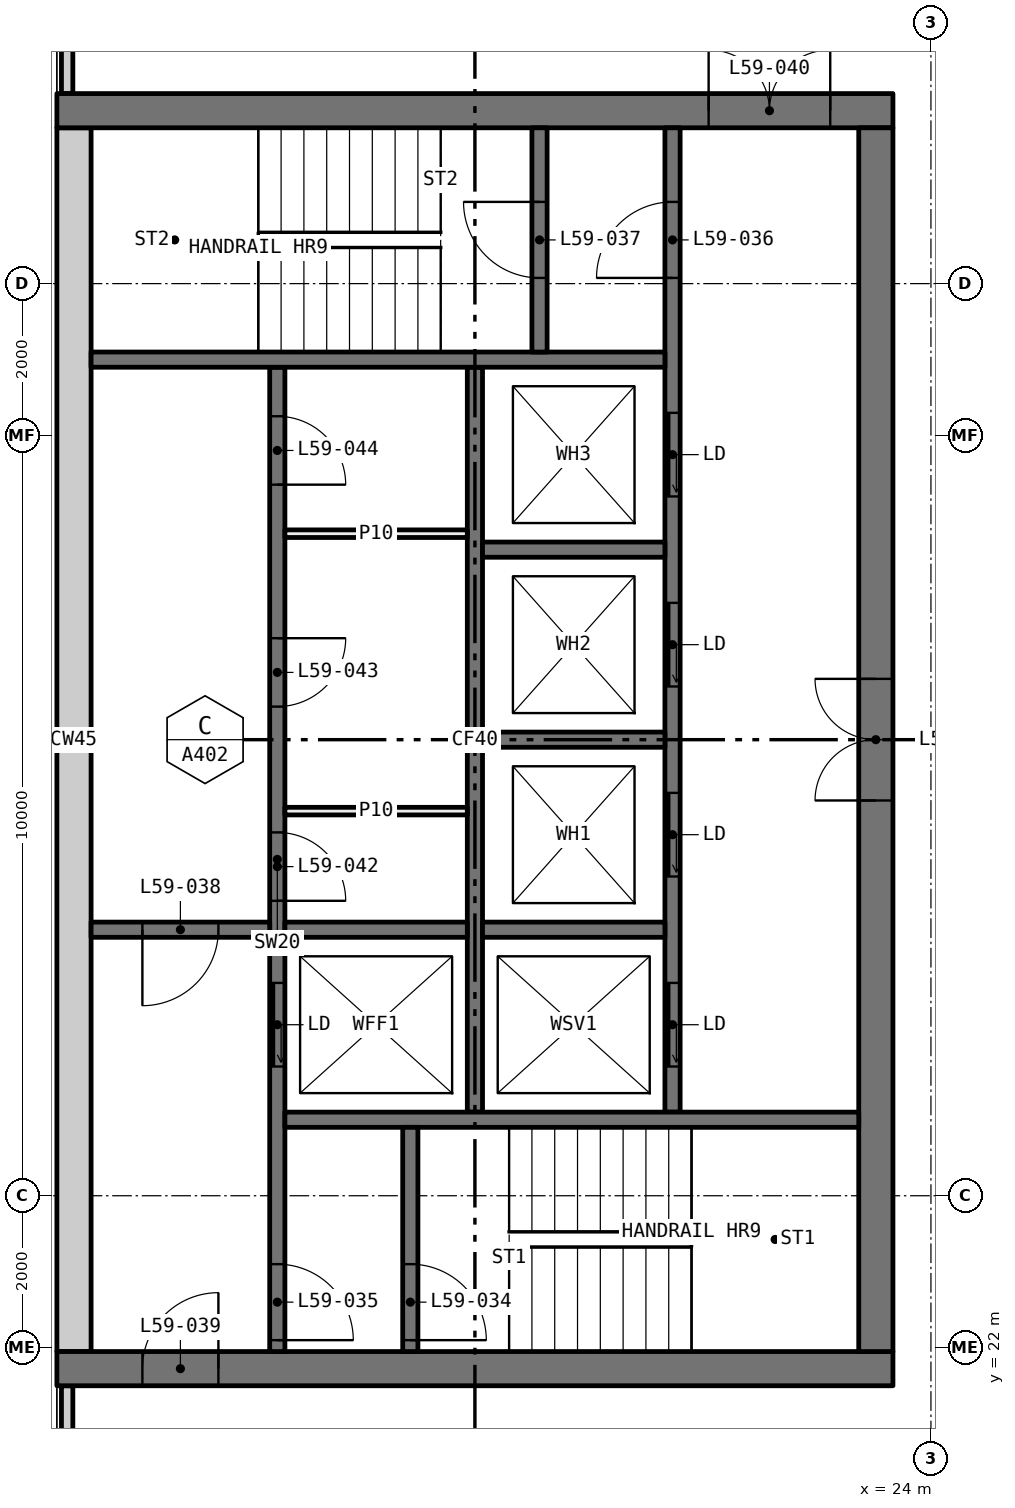
"""IFC4 building model, lengths in metres.
Left out: names, types, materials, properties, quantities, classifications, styles, units other than length and angle.
Written with IfcOpenShell. Run it as: python <this file> out.ifc"""

import sys

from ifc_helpers import new_model, si_unit, direction, frame, frame_2d, origin, place, context, subcontext, project, spatial, rectangle, extrude, element, fill, save


model = new_model("IFC4")
c1 = context("Model", 3, precision=1e-05, world=origin(), true_north=direction((0.0, 1.0)))
c2 = subcontext(c1, "Body", "Model", "MODEL_VIEW")
j1 = project(units=[si_unit("LENGTHUNIT", "METRE"), si_unit("PLANEANGLEUNIT", "RADIAN")], contexts=[c1])
p1 = place(None, origin())
s1 = spatial("IfcSite", under=j1, at=p1, CompositionType="ELEMENT")
p2 = place(p1, origin())
s2 = spatial("IfcBuilding", under=s1, at=p2, CompositionType="ELEMENT")
p3 = place(p2, frame((0.0, 0.0, 221.4)))
s3 = spatial("IfcBuildingStorey", under=s2, at=p3, CompositionType="ELEMENT", Elevation=221.4)
for number, where, z_axis, x_axis in (
    (1, (12.635, 18.71, 0.0), (0.0, 0.0, 1.0), (0.0, 1.0, 0.0)),
    (2, (12.635, 38.5, 0.0), (0.0, 0.0, 1.0), (0.0, 1.0, 0.0)),
):
    element("IfcWall", number, at=place(p3, frame(where, z_axis=z_axis, x_axis=x_axis)), inside=s3, PredefinedType="ELEMENTEDWALL", context=c2, shape_type="SweptSolid", body=[
        extrude(rectangle(XDim=2.79, YDim=0.15, at=frame_2d((1.395, 0.0))), origin(), (0.0, 0.0, 1.0), 3.05),
    ])
p4 = place(p3, frame((12.5, 21.725, 0.0), z_axis=(0.0, 0.0, 1.0), x_axis=(1.0, 0.0, 0.0)))
e3 = element("IfcWall", 3, at=p4, inside=s3, PredefinedType="SHEAR", context=c2, shape_type="SweptSolid", body=[
    extrude(rectangle(XDim=11.0, YDim=0.45, at=frame_2d((5.5, 0.0))), origin(), (0.0, 0.0, 1.0), 3.05),
])
p5 = place(p4, frame((1.125, 0.0, 0.0)))
e4 = element("IfcOpeningElement", 4, at=p5, cuts=e3, PredefinedType="OPENING", context=c2, shape_type="SweptSolid", body=[
    extrude(rectangle(XDim=1.0, YDim=2.1, at=frame_2d((0.5, 1.05))), frame((0.0, 0.235, 0.0), z_axis=(0.0, -1.0, 0.0), x_axis=(1.0, 0.0, 0.0)), (0.0, 0.0, 1.0), 0.47),
])
p6 = place(p3, frame((12.5, 38.275, 0.0), z_axis=(0.0, 0.0, 1.0), x_axis=(1.0, 0.0, 0.0)))
e5 = element("IfcWall", 5, at=p6, inside=s3, PredefinedType="SHEAR", context=c2, shape_type="SweptSolid", body=[
    extrude(rectangle(XDim=11.0, YDim=0.45, at=frame_2d((5.5, 0.0))), origin(), (0.0, 0.0, 1.0), 3.05),
])
p7 = place(p6, frame((8.575, 0.0, 0.0)))
e6 = element("IfcOpeningElement", 6, at=p7, cuts=e5, PredefinedType="OPENING", context=c2, shape_type="SweptSolid", body=[
    extrude(rectangle(XDim=1.6, YDim=2.1, at=frame_2d((0.8, 1.05))), frame((0.0, 0.235, 0.0), z_axis=(0.0, -1.0, 0.0), x_axis=(1.0, 0.0, 0.0)), (0.0, 0.0, 1.0), 0.47),
])
p8 = place(p3, frame((12.725, 21.95, 0.0), z_axis=(0.0, 0.0, 1.0), x_axis=(0.0, 1.0, 0.0)))
e7 = element("IfcWall", 7, at=p8, inside=s3, PredefinedType="SHEAR", context=c2, shape_type="SweptSolid", body=[
    extrude(rectangle(XDim=16.1, YDim=0.45, at=frame_2d((8.05, 0.0))), origin(), (0.0, 0.0, 1.0), 3.05),
])
p9 = place(p3, frame((23.275, 21.95, 0.0), z_axis=(0.0, 0.0, 1.0), x_axis=(0.0, 1.0, 0.0)))
e8 = element("IfcWall", 8, at=p9, inside=s3, PredefinedType="SHEAR", context=c2, shape_type="SweptSolid", body=[
    extrude(rectangle(XDim=16.1, YDim=0.45, at=frame_2d((8.05, 0.0))), origin(), (0.0, 0.0, 1.0), 3.05),
])
p10 = place(p9, frame((7.25, 0.0, 0.0)))
e9 = element("IfcOpeningElement", 9, at=p10, cuts=e8, PredefinedType="OPENING", context=c2, shape_type="SweptSolid", body=[
    extrude(rectangle(XDim=1.6, YDim=2.1, at=frame_2d((0.8, 1.05))), frame((0.0, 0.235, 0.0), z_axis=(0.0, -1.0, 0.0), x_axis=(1.0, 0.0, 0.0)), (0.0, 0.0, 1.0), 0.47),
])
p11 = place(p3, frame((15.4, 21.95, 0.0), z_axis=(0.0, 0.0, 1.0), x_axis=(0.0, 1.0, 0.0)))
e10 = element("IfcWall", 10, at=p11, inside=s3, PredefinedType="SOLIDWALL", context=c2, shape_type="SweptSolid", body=[
    extrude(rectangle(XDim=12.95, YDim=0.2, at=frame_2d((6.475, 0.0))), origin(), (0.0, 0.0, 1.0), 3.05),
])
p12 = place(p11, frame((3.75, 0.0, 0.0)))
e11 = element("IfcOpeningElement", 11, at=p12, cuts=e10, PredefinedType="OPENING", context=c2, shape_type="SweptSolid", body=[
    extrude(rectangle(XDim=1.1, YDim=2.1, at=frame_2d((0.55, 1.05))), frame((0.0, 0.11, 0.0), z_axis=(0.0, -1.0, 0.0), x_axis=(1.0, 0.0, 0.0)), (0.0, 0.0, 1.0), 0.22),
])
p13 = place(p11, frame((0.15, 0.0, 0.0)))
e12 = element("IfcOpeningElement", 12, at=p13, cuts=e10, PredefinedType="OPENING", context=c2, shape_type="SweptSolid", body=[
    extrude(rectangle(XDim=1.0, YDim=2.1, at=frame_2d((0.5, 1.05))), frame((0.0, 0.11, 0.0), z_axis=(0.0, -1.0, 0.0), x_axis=(1.0, 0.0, 0.0)), (0.0, 0.0, 1.0), 0.22),
])
p14 = place(p11, frame((5.93, 0.0, 0.0)))
e13 = element("IfcOpeningElement", 13, at=p14, cuts=e10, PredefinedType="OPENING", context=c2, shape_type="SweptSolid", body=[
    extrude(rectangle(XDim=0.9, YDim=2.1, at=frame_2d((0.45, 1.05))), frame((0.0, 0.11, 0.0), z_axis=(0.0, -1.0, 0.0), x_axis=(1.0, 0.0, 0.0)), (0.0, 0.0, 1.0), 0.22),
])
p15 = place(p11, frame((8.485, 0.0, 0.0)))
e14 = element("IfcOpeningElement", 14, at=p15, cuts=e10, PredefinedType="OPENING", context=c2, shape_type="SweptSolid", body=[
    extrude(rectangle(XDim=0.9, YDim=2.1, at=frame_2d((0.45, 1.05))), frame((0.0, 0.11, 0.0), z_axis=(0.0, -1.0, 0.0), x_axis=(1.0, 0.0, 0.0)), (0.0, 0.0, 1.0), 0.22),
])
p16 = place(p11, frame((11.405, 0.0, 0.0)))
e15 = element("IfcOpeningElement", 15, at=p16, cuts=e10, PredefinedType="OPENING", context=c2, shape_type="SweptSolid", body=[
    extrude(rectangle(XDim=0.9, YDim=2.1, at=frame_2d((0.45, 1.05))), frame((0.0, 0.11, 0.0), z_axis=(0.0, -1.0, 0.0), x_axis=(1.0, 0.0, 0.0)), (0.0, 0.0, 1.0), 0.22),
])
p17 = place(p3, frame((20.6, 25.1, 0.0), z_axis=(0.0, 0.0, 1.0), x_axis=(0.0, 1.0, 0.0)))
e16 = element("IfcWall", 16, at=p17, inside=s3, PredefinedType="SOLIDWALL", context=c2, shape_type="SweptSolid", body=[
    extrude(rectangle(XDim=12.95, YDim=0.2, at=frame_2d((6.475, 0.0))), origin(), (0.0, 0.0, 1.0), 3.05),
])
p18 = place(p17, frame((0.6, 0.0, 0.0)))
e17 = element("IfcOpeningElement", 17, at=p18, cuts=e16, PredefinedType="OPENING", context=c2, shape_type="SweptSolid", body=[
    extrude(rectangle(XDim=1.1, YDim=2.1, at=frame_2d((0.55, 1.05))), frame((0.0, 0.11, 0.0), z_axis=(0.0, -1.0, 0.0), x_axis=(1.0, 0.0, 0.0)), (0.0, 0.0, 1.0), 0.22),
])
p19 = place(p17, frame((3.1, 0.0, 0.0)))
e18 = element("IfcOpeningElement", 18, at=p19, cuts=e16, PredefinedType="OPENING", context=c2, shape_type="SweptSolid", body=[
    extrude(rectangle(XDim=1.1, YDim=2.1, at=frame_2d((0.55, 1.05))), frame((0.0, 0.11, 0.0), z_axis=(0.0, -1.0, 0.0), x_axis=(1.0, 0.0, 0.0)), (0.0, 0.0, 1.0), 0.22),
])
p20 = place(p17, frame((5.6, 0.0, 0.0)))
e19 = element("IfcOpeningElement", 19, at=p20, cuts=e16, PredefinedType="OPENING", context=c2, shape_type="SweptSolid", body=[
    extrude(rectangle(XDim=1.1, YDim=2.1, at=frame_2d((0.55, 1.05))), frame((0.0, 0.11, 0.0), z_axis=(0.0, -1.0, 0.0), x_axis=(1.0, 0.0, 0.0)), (0.0, 0.0, 1.0), 0.22),
])
p21 = place(p17, frame((8.1, 0.0, 0.0)))
e20 = element("IfcOpeningElement", 20, at=p21, cuts=e16, PredefinedType="OPENING", context=c2, shape_type="SweptSolid", body=[
    extrude(rectangle(XDim=1.1, YDim=2.1, at=frame_2d((0.55, 1.05))), frame((0.0, 0.11, 0.0), z_axis=(0.0, -1.0, 0.0), x_axis=(1.0, 0.0, 0.0)), (0.0, 0.0, 1.0), 0.22),
])
p22 = place(p17, frame((10.975, 0.0, 0.0)))
e21 = element("IfcOpeningElement", 21, at=p22, cuts=e16, PredefinedType="OPENING", context=c2, shape_type="SweptSolid", body=[
    extrude(rectangle(XDim=1.0, YDim=2.1, at=frame_2d((0.5, 1.05))), frame((0.0, 0.11, 0.0), z_axis=(0.0, -1.0, 0.0), x_axis=(1.0, 0.0, 0.0)), (0.0, 0.0, 1.0), 0.22),
])
p23 = place(p3, frame((18.0, 25.1, 0.0), z_axis=(0.0, 0.0, 1.0), x_axis=(0.0, 1.0, 0.0)))
e22 = element("IfcWall", 22, at=p23, inside=s3, PredefinedType="SOLIDWALL", context=c2, shape_type="SweptSolid", body=[
    extrude(rectangle(XDim=9.8, YDim=0.2, at=frame_2d((4.9, 0.0))), origin(), (0.0, 0.0, 1.0), 3.05),
])
for number, where, z_axis, x_axis in (
    (23, (15.5, 25.0, 0.0), (0.0, 0.0, 1.0), (1.0, 0.0, 0.0)),
    (24, (12.95, 35.0, 0.0), (0.0, 0.0, 1.0), (1.0, 0.0, 0.0)),
):
    element("IfcWall", number, at=place(p3, frame(where, z_axis=z_axis, x_axis=x_axis)), inside=s3, PredefinedType="SOLIDWALL", context=c2, shape_type="SweptSolid", body=[
        extrude(rectangle(XDim=7.55, YDim=0.2, at=frame_2d((3.775, 0.0))), origin(), (0.0, 0.0, 1.0), 3.05),
    ])
p24 = place(p3, frame((12.95, 27.5, 0.0), z_axis=(0.0, 0.0, 1.0), x_axis=(1.0, 0.0, 0.0)))
e25 = element("IfcWall", 25, at=p24, inside=s3, PredefinedType="SOLIDWALL", context=c2, shape_type="SweptSolid", body=[
    extrude(rectangle(XDim=2.35, YDim=0.2, at=frame_2d((1.175, 0.0))), origin(), (0.0, 0.0, 1.0), 3.05),
])
p25 = place(p24, frame((0.675, 0.0, 0.0)))
e26 = element("IfcOpeningElement", 26, at=p25, cuts=e25, PredefinedType="OPENING", context=c2, shape_type="SweptSolid", body=[
    extrude(rectangle(XDim=1.0, YDim=2.1, at=frame_2d((0.5, 1.05))), frame((0.0, 0.11, 0.0), z_axis=(0.0, -1.0, 0.0), x_axis=(1.0, 0.0, 0.0)), (0.0, 0.0, 1.0), 0.22),
])
p26 = place(p3, frame((17.15, 21.95, 0.0), z_axis=(0.0, 0.0, 1.0), x_axis=(0.0, 1.0, 0.0)))
e27 = element("IfcWall", 27, at=p26, inside=s3, PredefinedType="SOLIDWALL", context=c2, shape_type="SweptSolid", body=[
    extrude(rectangle(XDim=2.95, YDim=0.2, at=frame_2d((1.475, 0.0))), origin(), (0.0, 0.0, 1.0), 3.05),
])
p27 = place(p26, frame((0.15, 0.0, 0.0)))
e28 = element("IfcOpeningElement", 28, at=p27, cuts=e27, PredefinedType="OPENING", context=c2, shape_type="SweptSolid", body=[
    extrude(rectangle(XDim=1.0, YDim=2.1, at=frame_2d((0.5, 1.05))), frame((0.0, 0.11, 0.0), z_axis=(0.0, -1.0, 0.0), x_axis=(1.0, 0.0, 0.0)), (0.0, 0.0, 1.0), 0.22),
])
p28 = place(p3, frame((18.85, 35.1, 0.0), z_axis=(0.0, 0.0, 1.0), x_axis=(0.0, 1.0, 0.0)))
e29 = element("IfcWall", 29, at=p28, inside=s3, PredefinedType="SOLIDWALL", context=c2, shape_type="SweptSolid", body=[
    extrude(rectangle(XDim=2.95, YDim=0.2, at=frame_2d((1.475, 0.0))), origin(), (0.0, 0.0, 1.0), 3.05),
])
p29 = place(p28, frame((0.975, 0.0, 0.0)))
e30 = element("IfcOpeningElement", 30, at=p29, cuts=e29, PredefinedType="OPENING", context=c2, shape_type="SweptSolid", body=[
    extrude(rectangle(XDim=1.0, YDim=2.1, at=frame_2d((0.5, 1.05))), frame((0.0, 0.11, 0.0), z_axis=(0.0, -1.0, 0.0), x_axis=(1.0, 0.0, 0.0)), (0.0, 0.0, 1.0), 0.22),
])
for number, where, z_axis, x_axis in (
    (31, (15.5, 27.5, 0.0), (0.0, 0.0, 1.0), (1.0, 0.0, 0.0)),
    (32, (18.1, 27.5, 0.0), (0.0, 0.0, 1.0), (1.0, 0.0, 0.0)),
    (33, (18.1, 30.0, 0.0), (0.0, 0.0, 1.0), (1.0, 0.0, 0.0)),
    (34, (18.1, 32.5, 0.0), (0.0, 0.0, 1.0), (1.0, 0.0, 0.0)),
):
    element("IfcWall", number, at=place(p3, frame(where, z_axis=z_axis, x_axis=x_axis)), inside=s3, PredefinedType="SOLIDWALL", context=c2, shape_type="SweptSolid", body=[
        extrude(rectangle(XDim=2.4, YDim=0.2, at=frame_2d((1.2, 0.0))), origin(), (0.0, 0.0, 1.0), 3.05),
    ])
for number, where, z_axis, x_axis in (
    (35, (15.5, 29.06, 0.0), (0.0, 0.0, 1.0), (1.0, 0.0, 0.0)),
    (36, (15.5, 32.71, 0.0), (0.0, 0.0, 1.0), (1.0, 0.0, 0.0)),
):
    element("IfcWall", number, at=place(p3, frame(where, z_axis=z_axis, x_axis=x_axis)), inside=s3, PredefinedType="PARTITIONING", context=c2, shape_type="SweptSolid", body=[
        extrude(rectangle(XDim=2.4, YDim=0.1, at=frame_2d((1.2, 0.0))), origin(), (0.0, 0.0, 1.0), 3.05),
    ])
p30 = place(p18, origin())
e37 = element("IfcDoor", 37, at=p30, inside=s3, OperationType="SLIDING_TO_LEFT", PredefinedType="DOOR", context=c2, shape_type="SweptSolid", body=[
    extrude(rectangle(XDim=1.1, YDim=2.1, at=frame_2d((0.55, 1.05))), frame((0.0, 0.025, 0.0), z_axis=(0.0, -1.0, 0.0), x_axis=(1.0, 0.0, 0.0)), (0.0, 0.0, 1.0), 0.05),
])
fill(e17, e37)
p31 = place(p19, origin())
e38 = element("IfcDoor", 38, at=p31, inside=s3, OperationType="SLIDING_TO_LEFT", PredefinedType="DOOR", context=c2, shape_type="SweptSolid", body=[
    extrude(rectangle(XDim=1.1, YDim=2.1, at=frame_2d((0.55, 1.05))), frame((0.0, 0.025, 0.0), z_axis=(0.0, -1.0, 0.0), x_axis=(1.0, 0.0, 0.0)), (0.0, 0.0, 1.0), 0.05),
])
fill(e18, e38)
p32 = place(p20, origin())
e39 = element("IfcDoor", 39, at=p32, inside=s3, OperationType="SLIDING_TO_LEFT", PredefinedType="DOOR", context=c2, shape_type="SweptSolid", body=[
    extrude(rectangle(XDim=1.1, YDim=2.1, at=frame_2d((0.55, 1.05))), frame((0.0, 0.025, 0.0), z_axis=(0.0, -1.0, 0.0), x_axis=(1.0, 0.0, 0.0)), (0.0, 0.0, 1.0), 0.05),
])
fill(e19, e39)
p33 = place(p21, origin())
e40 = element("IfcDoor", 40, at=p33, inside=s3, OperationType="SLIDING_TO_LEFT", PredefinedType="DOOR", context=c2, shape_type="SweptSolid", body=[
    extrude(rectangle(XDim=1.1, YDim=2.1, at=frame_2d((0.55, 1.05))), frame((0.0, 0.025, 0.0), z_axis=(0.0, -1.0, 0.0), x_axis=(1.0, 0.0, 0.0)), (0.0, 0.0, 1.0), 0.05),
])
fill(e20, e40)
p34 = place(p12, origin())
e41 = element("IfcDoor", 41, at=p34, inside=s3, OperationType="SLIDING_TO_LEFT", PredefinedType="DOOR", context=c2, shape_type="SweptSolid", body=[
    extrude(rectangle(XDim=1.1, YDim=2.1, at=frame_2d((0.55, 1.05))), frame((0.0, 0.025, 0.0), z_axis=(0.0, -1.0, 0.0), x_axis=(1.0, 0.0, 0.0)), (0.0, 0.0, 1.0), 0.05),
])
fill(e11, e41)
p35 = place(p27, frame((1.0, 0.0, 0.0), x_axis=(-1.0, 0.0, 0.0)))
e42 = element("IfcDoor", 42, at=p35, inside=s3, OperationType="SINGLE_SWING_LEFT", PredefinedType="DOOR", context=c2, shape_type="SweptSolid", body=[
    extrude(rectangle(XDim=1.0, YDim=2.1, at=frame_2d((0.5, 1.05))), frame((0.0, 0.025, 0.0), z_axis=(0.0, -1.0, 0.0), x_axis=(1.0, 0.0, 0.0)), (0.0, 0.0, 1.0), 0.05),
])
fill(e28, e42)
p36 = place(p13, frame((1.0, 0.0, 0.0), x_axis=(-1.0, 0.0, 0.0)))
e43 = element("IfcDoor", 43, at=p36, inside=s3, OperationType="SINGLE_SWING_LEFT", PredefinedType="DOOR", context=c2, shape_type="SweptSolid", body=[
    extrude(rectangle(XDim=1.0, YDim=2.1, at=frame_2d((0.5, 1.05))), frame((0.0, 0.025, 0.0), z_axis=(0.0, -1.0, 0.0), x_axis=(1.0, 0.0, 0.0)), (0.0, 0.0, 1.0), 0.05),
])
fill(e12, e43)
p37 = place(p22, origin())
e44 = element("IfcDoor", 44, at=p37, inside=s3, OperationType="SINGLE_SWING_RIGHT", PredefinedType="DOOR", context=c2, shape_type="SweptSolid", body=[
    extrude(rectangle(XDim=1.0, YDim=2.1, at=frame_2d((0.5, 1.05))), frame((0.0, 0.025, 0.0), z_axis=(0.0, -1.0, 0.0), x_axis=(1.0, 0.0, 0.0)), (0.0, 0.0, 1.0), 0.05),
])
fill(e21, e44)
p38 = place(p29, origin())
e45 = element("IfcDoor", 45, at=p38, inside=s3, OperationType="SINGLE_SWING_LEFT", PredefinedType="DOOR", context=c2, shape_type="SweptSolid", body=[
    extrude(rectangle(XDim=1.0, YDim=2.1, at=frame_2d((0.5, 1.05))), frame((0.0, 0.025, 0.0), z_axis=(0.0, -1.0, 0.0), x_axis=(1.0, 0.0, 0.0)), (0.0, 0.0, 1.0), 0.05),
])
fill(e30, e45)
p39 = place(p25, frame((1.0, 0.0, 0.0), x_axis=(-1.0, 0.0, 0.0)))
e46 = element("IfcDoor", 46, at=p39, inside=s3, OperationType="SINGLE_SWING_LEFT", PredefinedType="DOOR", context=c2, shape_type="SweptSolid", body=[
    extrude(rectangle(XDim=1.0, YDim=2.1, at=frame_2d((0.5, 1.05))), frame((0.0, 0.025, 0.0), z_axis=(0.0, -1.0, 0.0), x_axis=(1.0, 0.0, 0.0)), (0.0, 0.0, 1.0), 0.05),
])
fill(e26, e46)
p40 = place(p5, origin())
e47 = element("IfcDoor", 47, at=p40, inside=s3, OperationType="SINGLE_SWING_LEFT", PredefinedType="DOOR", context=c2, shape_type="SweptSolid", body=[
    extrude(rectangle(XDim=1.0, YDim=2.1, at=frame_2d((0.5, 1.05))), frame((0.0, 0.025, 0.0), z_axis=(0.0, -1.0, 0.0), x_axis=(1.0, 0.0, 0.0)), (0.0, 0.0, 1.0), 0.05),
])
fill(e4, e47)
p41 = place(p7, origin())
e48 = element("IfcDoor", 48, at=p41, inside=s3, OperationType="DOUBLE_DOOR_SINGLE_SWING", PredefinedType="DOOR", context=c2, shape_type="SweptSolid", body=[
    extrude(rectangle(XDim=1.6, YDim=2.1, at=frame_2d((0.8, 1.05))), frame((0.0, 0.025, 0.0), z_axis=(0.0, -1.0, 0.0), x_axis=(1.0, 0.0, 0.0)), (0.0, 0.0, 1.0), 0.05),
])
fill(e6, e48)
p42 = place(p10, origin())
e49 = element("IfcDoor", 49, at=p42, inside=s3, OperationType="DOUBLE_DOOR_SINGLE_SWING", PredefinedType="DOOR", context=c2, shape_type="SweptSolid", body=[
    extrude(rectangle(XDim=1.6, YDim=2.1, at=frame_2d((0.8, 1.05))), frame((0.0, 0.025, 0.0), z_axis=(0.0, -1.0, 0.0), x_axis=(1.0, 0.0, 0.0)), (0.0, 0.0, 1.0), 0.05),
])
fill(e9, e49)
p43 = place(p14, frame((0.9, 0.0, 0.0), x_axis=(-1.0, 0.0, 0.0)))
e50 = element("IfcDoor", 50, at=p43, inside=s3, OperationType="SINGLE_SWING_LEFT", PredefinedType="DOOR", context=c2, shape_type="SweptSolid", body=[
    extrude(rectangle(XDim=0.9, YDim=2.1, at=frame_2d((0.45, 1.05))), frame((0.0, 0.025, 0.0), z_axis=(0.0, -1.0, 0.0), x_axis=(1.0, 0.0, 0.0)), (0.0, 0.0, 1.0), 0.05),
])
fill(e13, e50)
p44 = place(p15, frame((0.9, 0.0, 0.0), x_axis=(-1.0, 0.0, 0.0)))
e51 = element("IfcDoor", 51, at=p44, inside=s3, OperationType="SINGLE_SWING_RIGHT", PredefinedType="DOOR", context=c2, shape_type="SweptSolid", body=[
    extrude(rectangle(XDim=0.9, YDim=2.1, at=frame_2d((0.45, 1.05))), frame((0.0, 0.025, 0.0), z_axis=(0.0, -1.0, 0.0), x_axis=(1.0, 0.0, 0.0)), (0.0, 0.0, 1.0), 0.05),
])
fill(e14, e51)
p45 = place(p16, frame((0.9, 0.0, 0.0), x_axis=(-1.0, 0.0, 0.0)))
e52 = element("IfcDoor", 52, at=p45, inside=s3, OperationType="SINGLE_SWING_LEFT", PredefinedType="DOOR", context=c2, shape_type="SweptSolid", body=[
    extrude(rectangle(XDim=0.9, YDim=2.1, at=frame_2d((0.45, 1.05))), frame((0.0, 0.025, 0.0), z_axis=(0.0, -1.0, 0.0), x_axis=(1.0, 0.0, 0.0)), (0.0, 0.0, 1.0), 0.05),
])
fill(e15, e52)
save(model, sys.argv[1])
